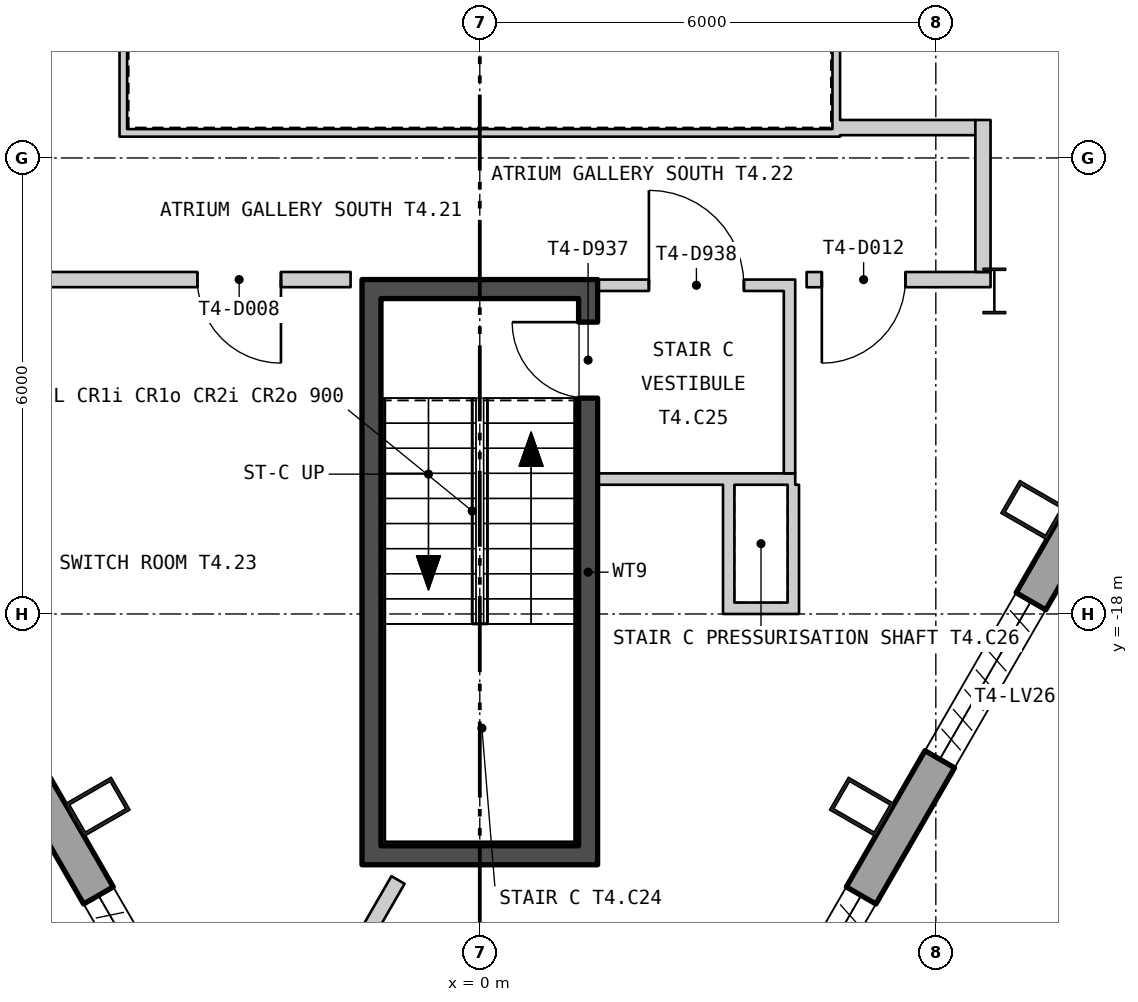
"""IFC4 building model, lengths in metres.
Left out: names, types, materials, properties, quantities, classifications, styles, units other than length and angle.
Written with IfcOpenShell. Run it as: python <this file> out.ifc"""

import sys

from ifc_helpers import new_model, si_unit, direction, frame, frame_2d, origin, origin_2d, place, context, subcontext, project, spatial, polyline, rectangle, hollow_rectangle, i_section, outline, extrude, element, fill, save


model = new_model("IFC4")
c1 = context("Model", 3, precision=1e-05, world=origin(), true_north=direction((0.0, 1.0)))
c2 = subcontext(c1, "Body", "Model", "MODEL_VIEW")
j1 = project(units=[si_unit("LENGTHUNIT", "METRE"), si_unit("PLANEANGLEUNIT", "RADIAN")], contexts=[c1])
p1 = place(None, origin())
s1 = spatial("IfcSite", under=j1, at=p1, CompositionType="ELEMENT")
p2 = place(p1, origin())
s2 = spatial("IfcBuilding", under=s1, at=p2, CompositionType="ELEMENT")
p3 = place(p2, frame((0.0, 0.0, 239.4)))
s3 = spatial("IfcBuildingStorey", under=s2, at=p3, CompositionType="ELEMENT", Elevation=239.4)
for number, where, z_axis, x_axis in (
    (1, (-5.027, -20.537, 0.0), (0.0, 0.0, 1.0), (0.5, -0.866, 0.0)),
    (2, (5.027, -20.537, 0.0), (0.0, 0.0, 1.0), (0.5, 0.866, 0.0)),
    (3, (7.281, -16.633, 0.0), (0.0, 0.0, 1.0), (0.5, 0.866, 0.0)),
):
    element("IfcColumn", number, at=place(p3, frame(where, z_axis=z_axis, x_axis=x_axis)), inside=s3, PredefinedType="COLUMN", context=c2, shape_type="SweptSolid", body=[
        extrude(hollow_rectangle(XDim=0.5, YDim=0.7, WallThickness=0.045, at=origin_2d()), origin(), (0.0, 0.0, 1.0), 6.0),
    ])
p4 = place(p3, frame((6.77, -13.75, 0.0), z_axis=(0.0, 0.0, 1.0), x_axis=(1.0, 0.0, 0.0)))
e4 = element("IfcColumn", 4, at=p4, inside=s3, PredefinedType="COLUMN", context=c2, shape_type="SweptSolid", body=[
    extrude(i_section(OverallWidth=0.3, OverallDepth=0.6, WebThickness=0.015, FlangeThickness=0.03, at=origin_2d()), origin(), (0.0, 0.0, 1.0), 6.0),
])
p5 = place(p3, frame((-25.975, 14.597, -0.18), z_axis=(0.0, 0.0, 1.0), x_axis=(0.499999764979, -0.866025539474, 0.0)))
e5 = element("IfcWall", 5, at=p5, inside=s3, PredefinedType="SOLIDWALL", context=c2, shape_type="SweptSolid", body=[
    extrude(outline(polyline([(-0.13, -0.225), (45.87, -0.225), (45.61, 0.225), (0.13, 0.225), (-0.13, -0.225)])), origin(), (0.0, 0.0, 1.0), 6.0),
])
p6 = place(p5, frame((1.424, 0.0, 1.38)))
e6 = element("IfcOpeningElement", 6, at=p6, cuts=e5, PredefinedType="OPENING", context=c2, shape_type="SweptSolid", body=[
    extrude(rectangle(XDim=2.4, YDim=3.6, at=frame_2d((1.2, 1.8))), frame((0.0, 0.235, 0.0), z_axis=(0.0, -1.0, 0.0), x_axis=(1.0, 0.0, 0.0)), (0.0, 0.0, 1.0), 0.47),
])
p7 = place(p5, frame((5.893, 0.0, 1.38)))
e7 = element("IfcOpeningElement", 7, at=p7, cuts=e5, PredefinedType="OPENING", context=c2, shape_type="SweptSolid", body=[
    extrude(rectangle(XDim=2.4, YDim=3.6, at=frame_2d((1.2, 1.8))), frame((0.0, 0.235, 0.0), z_axis=(0.0, -1.0, 0.0), x_axis=(1.0, 0.0, 0.0)), (0.0, 0.0, 1.0), 0.47),
])
p8 = place(p5, frame((10.401, 0.0, 1.38)))
e8 = element("IfcOpeningElement", 8, at=p8, cuts=e5, PredefinedType="OPENING", context=c2, shape_type="SweptSolid", body=[
    extrude(rectangle(XDim=2.4, YDim=3.6, at=frame_2d((1.2, 1.8))), frame((0.0, 0.235, 0.0), z_axis=(0.0, -1.0, 0.0), x_axis=(1.0, 0.0, 0.0)), (0.0, 0.0, 1.0), 0.47),
])
p9 = place(p5, frame((14.909, 0.0, 1.38)))
e9 = element("IfcOpeningElement", 9, at=p9, cuts=e5, PredefinedType="OPENING", context=c2, shape_type="SweptSolid", body=[
    extrude(rectangle(XDim=2.4, YDim=3.6, at=frame_2d((1.2, 1.8))), frame((0.0, 0.235, 0.0), z_axis=(0.0, -1.0, 0.0), x_axis=(1.0, 0.0, 0.0)), (0.0, 0.0, 1.0), 0.47),
])
p10 = place(p5, frame((19.416, 0.0, 1.38)))
e10 = element("IfcOpeningElement", 10, at=p10, cuts=e5, PredefinedType="OPENING", context=c2, shape_type="SweptSolid", body=[
    extrude(rectangle(XDim=2.4, YDim=3.6, at=frame_2d((1.2, 1.8))), frame((0.0, 0.235, 0.0), z_axis=(0.0, -1.0, 0.0), x_axis=(1.0, 0.0, 0.0)), (0.0, 0.0, 1.0), 0.47),
])
p11 = place(p5, frame((23.924, 0.0, 1.38)))
e11 = element("IfcOpeningElement", 11, at=p11, cuts=e5, PredefinedType="OPENING", context=c2, shape_type="SweptSolid", body=[
    extrude(rectangle(XDim=2.4, YDim=3.6, at=frame_2d((1.2, 1.8))), frame((0.0, 0.235, 0.0), z_axis=(0.0, -1.0, 0.0), x_axis=(1.0, 0.0, 0.0)), (0.0, 0.0, 1.0), 0.47),
])
p12 = place(p5, frame((28.431, 0.0, 1.38)))
e12 = element("IfcOpeningElement", 12, at=p12, cuts=e5, PredefinedType="OPENING", context=c2, shape_type="SweptSolid", body=[
    extrude(rectangle(XDim=2.4, YDim=3.6, at=frame_2d((1.2, 1.8))), frame((0.0, 0.235, 0.0), z_axis=(0.0, -1.0, 0.0), x_axis=(1.0, 0.0, 0.0)), (0.0, 0.0, 1.0), 0.47),
])
p13 = place(p5, frame((32.939, 0.0, 1.38)))
e13 = element("IfcOpeningElement", 13, at=p13, cuts=e5, PredefinedType="OPENING", context=c2, shape_type="SweptSolid", body=[
    extrude(rectangle(XDim=2.4, YDim=3.6, at=frame_2d((1.2, 1.8))), frame((0.0, 0.235, 0.0), z_axis=(0.0, -1.0, 0.0), x_axis=(1.0, 0.0, 0.0)), (0.0, 0.0, 1.0), 0.47),
])
p14 = place(p5, frame((37.447, 0.0, 1.38)))
e14 = element("IfcOpeningElement", 14, at=p14, cuts=e5, PredefinedType="OPENING", context=c2, shape_type="SweptSolid", body=[
    extrude(rectangle(XDim=2.4, YDim=3.6, at=frame_2d((1.2, 1.8))), frame((0.0, 0.235, 0.0), z_axis=(0.0, -1.0, 0.0), x_axis=(1.0, 0.0, 0.0)), (0.0, 0.0, 1.0), 0.47),
])
p15 = place(p5, frame((41.916, 0.0, 1.38)))
e15 = element("IfcOpeningElement", 15, at=p15, cuts=e5, PredefinedType="OPENING", context=c2, shape_type="SweptSolid", body=[
    extrude(rectangle(XDim=2.4, YDim=3.6, at=frame_2d((1.2, 1.8))), frame((0.0, 0.235, 0.0), z_axis=(0.0, -1.0, 0.0), x_axis=(1.0, 0.0, 0.0)), (0.0, 0.0, 1.0), 0.47),
])
p16 = place(p3, frame((3.105, -25.015, -0.18), z_axis=(0.0, 0.0, 1.0), x_axis=(0.499999764979, 0.866025539474, 0.0)))
e16 = element("IfcWall", 16, at=p16, inside=s3, PredefinedType="SOLIDWALL", context=c2, shape_type="SweptSolid", body=[
    extrude(outline(polyline([(-0.13, -0.225), (45.87, -0.225), (45.61, 0.225), (0.13, 0.225), (-0.13, -0.225)])), origin(), (0.0, 0.0, 1.0), 6.0),
])
p17 = place(p16, frame((1.424, 0.0, 1.38)))
e17 = element("IfcOpeningElement", 17, at=p17, cuts=e16, PredefinedType="OPENING", context=c2, shape_type="SweptSolid", body=[
    extrude(rectangle(XDim=2.4, YDim=3.6, at=frame_2d((1.2, 1.8))), frame((0.0, 0.235, 0.0), z_axis=(0.0, -1.0, 0.0), x_axis=(1.0, 0.0, 0.0)), (0.0, 0.0, 1.0), 0.47),
])
p18 = place(p16, frame((5.893, 0.0, 1.38)))
e18 = element("IfcOpeningElement", 18, at=p18, cuts=e16, PredefinedType="OPENING", context=c2, shape_type="SweptSolid", body=[
    extrude(rectangle(XDim=2.4, YDim=3.6, at=frame_2d((1.2, 1.8))), frame((0.0, 0.235, 0.0), z_axis=(0.0, -1.0, 0.0), x_axis=(1.0, 0.0, 0.0)), (0.0, 0.0, 1.0), 0.47),
])
p19 = place(p16, frame((10.401, 0.0, 1.38)))
e19 = element("IfcOpeningElement", 19, at=p19, cuts=e16, PredefinedType="OPENING", context=c2, shape_type="SweptSolid", body=[
    extrude(rectangle(XDim=2.4, YDim=3.6, at=frame_2d((1.2, 1.8))), frame((0.0, 0.235, 0.0), z_axis=(0.0, -1.0, 0.0), x_axis=(1.0, 0.0, 0.0)), (0.0, 0.0, 1.0), 0.47),
])
p20 = place(p16, frame((14.909, 0.0, 1.38)))
e20 = element("IfcOpeningElement", 20, at=p20, cuts=e16, PredefinedType="OPENING", context=c2, shape_type="SweptSolid", body=[
    extrude(rectangle(XDim=2.4, YDim=3.6, at=frame_2d((1.2, 1.8))), frame((0.0, 0.235, 0.0), z_axis=(0.0, -1.0, 0.0), x_axis=(1.0, 0.0, 0.0)), (0.0, 0.0, 1.0), 0.47),
])
p21 = place(p16, frame((19.416, 0.0, 1.38)))
e21 = element("IfcOpeningElement", 21, at=p21, cuts=e16, PredefinedType="OPENING", context=c2, shape_type="SweptSolid", body=[
    extrude(rectangle(XDim=2.4, YDim=3.6, at=frame_2d((1.2, 1.8))), frame((0.0, 0.235, 0.0), z_axis=(0.0, -1.0, 0.0), x_axis=(1.0, 0.0, 0.0)), (0.0, 0.0, 1.0), 0.47),
])
p22 = place(p16, frame((23.924, 0.0, 1.38)))
e22 = element("IfcOpeningElement", 22, at=p22, cuts=e16, PredefinedType="OPENING", context=c2, shape_type="SweptSolid", body=[
    extrude(rectangle(XDim=2.4, YDim=3.6, at=frame_2d((1.2, 1.8))), frame((0.0, 0.235, 0.0), z_axis=(0.0, -1.0, 0.0), x_axis=(1.0, 0.0, 0.0)), (0.0, 0.0, 1.0), 0.47),
])
p23 = place(p16, frame((28.431, 0.0, 1.38)))
e23 = element("IfcOpeningElement", 23, at=p23, cuts=e16, PredefinedType="OPENING", context=c2, shape_type="SweptSolid", body=[
    extrude(rectangle(XDim=2.4, YDim=3.6, at=frame_2d((1.2, 1.8))), frame((0.0, 0.235, 0.0), z_axis=(0.0, -1.0, 0.0), x_axis=(1.0, 0.0, 0.0)), (0.0, 0.0, 1.0), 0.47),
])
p24 = place(p16, frame((32.939, 0.0, 1.38)))
e24 = element("IfcOpeningElement", 24, at=p24, cuts=e16, PredefinedType="OPENING", context=c2, shape_type="SweptSolid", body=[
    extrude(rectangle(XDim=2.4, YDim=3.6, at=frame_2d((1.2, 1.8))), frame((0.0, 0.235, 0.0), z_axis=(0.0, -1.0, 0.0), x_axis=(1.0, 0.0, 0.0)), (0.0, 0.0, 1.0), 0.47),
])
p25 = place(p16, frame((37.447, 0.0, 1.38)))
e25 = element("IfcOpeningElement", 25, at=p25, cuts=e16, PredefinedType="OPENING", context=c2, shape_type="SweptSolid", body=[
    extrude(rectangle(XDim=2.4, YDim=3.6, at=frame_2d((1.2, 1.8))), frame((0.0, 0.235, 0.0), z_axis=(0.0, -1.0, 0.0), x_axis=(1.0, 0.0, 0.0)), (0.0, 0.0, 1.0), 0.47),
])
p26 = place(p16, frame((41.916, 0.0, 1.38)))
e26 = element("IfcOpeningElement", 26, at=p26, cuts=e16, PredefinedType="OPENING", context=c2, shape_type="SweptSolid", body=[
    extrude(rectangle(XDim=2.4, YDim=3.6, at=frame_2d((1.2, 1.8))), frame((0.0, 0.235, 0.0), z_axis=(0.0, -1.0, 0.0), x_axis=(1.0, 0.0, 0.0)), (0.0, 0.0, 1.0), 0.47),
])
p27 = place(p3, frame((-4.74, -11.67, 0.0), z_axis=(0.0, 0.0, 1.0), x_axis=(1.0, 0.0, 0.0)))
e27 = element("IfcWall", 27, at=p27, inside=s3, PredefinedType="PARTITIONING", context=c2, shape_type="SweptSolid", body=[
    extrude(rectangle(XDim=9.48, YDim=0.1, at=frame_2d((4.74, 0.0))), origin(), (0.0, 0.0, 1.0), 5.8),
])
for number, where, z_axis, x_axis in (
    (28, (4.69, -11.62, 0.0), (0.0, 0.0, 1.0), (0.0, 1.0, 0.0)),
    (29, (-4.69, -3.58, 0.0), (0.0, 0.0, 1.0), (0.0, -1.0, 0.0)),
):
    element("IfcWall", number, at=place(p3, frame(where, z_axis=z_axis, x_axis=x_axis)), inside=s3, PredefinedType="PARTITIONING", context=c2, shape_type="SweptSolid", body=[
        extrude(rectangle(XDim=8.04, YDim=0.1, at=frame_2d((4.02, 0.0))), origin(), (0.0, 0.0, 1.0), 5.8),
    ])
p28 = place(p3, frame((-1.425, -21.05, 0.0), z_axis=(0.0, 0.0, 1.0), x_axis=(0.0, 1.0, 0.0)))
e30 = element("IfcWall", 30, at=p28, inside=s3, PredefinedType="SHEAR", context=c2, shape_type="SweptSolid", body=[
    extrude(rectangle(XDim=7.2, YDim=0.25, at=frame_2d((3.6, 0.0))), origin(), (0.0, 0.0, 1.0), 5.8),
])
p29 = place(p3, frame((1.425, -21.05, 0.0), z_axis=(0.0, 0.0, 1.0), x_axis=(0.0, 1.0, 0.0)))
e31 = element("IfcWall", 31, at=p29, inside=s3, PredefinedType="SHEAR", context=c2, shape_type="SweptSolid", body=[
    extrude(rectangle(XDim=7.2, YDim=0.25, at=frame_2d((3.6, 0.0))), origin(), (0.0, 0.0, 1.0), 5.8),
])
p30 = place(p29, frame((5.89, 0.0, 0.0)))
e32 = element("IfcOpeningElement", 32, at=p30, cuts=e31, PredefinedType="OPENING", context=c2, shape_type="SweptSolid", body=[
    extrude(rectangle(XDim=1.0, YDim=2.1, at=frame_2d((0.5, 1.05))), frame((0.0, 0.135, 0.0), z_axis=(0.0, -1.0, 0.0), x_axis=(1.0, 0.0, 0.0)), (0.0, 0.0, 1.0), 0.27),
])
for number, where, z_axis, x_axis in (
    (33, (-1.55, -21.175, 0.0), (0.0, 0.0, 1.0), (1.0, 0.0, 0.0)),
    (34, (-1.55, -13.725, 0.0), (0.0, 0.0, 1.0), (1.0, 0.0, 0.0)),
):
    element("IfcWall", number, at=place(p3, frame(where, z_axis=z_axis, x_axis=x_axis)), inside=s3, PredefinedType="SHEAR", context=c2, shape_type="SweptSolid", body=[
        extrude(rectangle(XDim=3.1, YDim=0.25, at=frame_2d((1.55, 0.0))), origin(), (0.0, 0.0, 1.0), 5.8),
    ])
p31 = place(p3, frame((1.55, -16.225, 0.0), z_axis=(0.0, 0.0, 1.0), x_axis=(1.0, 0.0, 0.0)))
e35 = element("IfcWall", 35, at=p31, inside=s3, PredefinedType="PARTITIONING", context=c2, shape_type="SweptSolid", body=[
    extrude(rectangle(XDim=2.6, YDim=0.15, at=frame_2d((1.3, 0.0))), origin(), (0.0, 0.0, 1.0), 5.8),
])
p32 = place(p3, frame((4.075, -16.15, 0.0), z_axis=(0.0, 0.0, 1.0), x_axis=(0.0, 1.0, 0.0)))
e36 = element("IfcWall", 36, at=p32, inside=s3, PredefinedType="PARTITIONING", context=c2, shape_type="SweptSolid", body=[
    extrude(rectangle(XDim=2.4, YDim=0.15, at=frame_2d((1.2, 0.0))), origin(), (0.0, 0.0, 1.0), 5.8),
])
p33 = place(p3, frame((1.55, -13.675, 0.0), z_axis=(0.0, 0.0, 1.0), x_axis=(1.0, 0.0, 0.0)))
e37 = element("IfcWall", 37, at=p33, inside=s3, PredefinedType="PARTITIONING", context=c2, shape_type="SweptSolid", body=[
    extrude(rectangle(XDim=2.6, YDim=0.15, at=frame_2d((1.3, 0.0))), origin(), (0.0, 0.0, 1.0), 5.01),
])
p34 = place(p33, frame((0.675, 0.0, 0.0)))
e38 = element("IfcOpeningElement", 38, at=p34, cuts=e37, PredefinedType="OPENING", context=c2, shape_type="SweptSolid", body=[
    extrude(rectangle(XDim=1.25, YDim=2.1, at=frame_2d((0.625, 1.05))), frame((0.0, 0.085, 0.0), z_axis=(0.0, -1.0, 0.0), x_axis=(1.0, 0.0, 0.0)), (0.0, 0.0, 1.0), 0.17),
])
p35 = place(p3, frame((3.275, -18.0, 0.0), z_axis=(0.0, 0.0, 1.0), x_axis=(0.0, 1.0, 0.0)))
e39 = element("IfcWall", 39, at=p35, inside=s3, PredefinedType="PARTITIONING", context=c2, shape_type="SweptSolid", body=[
    extrude(rectangle(XDim=1.7, YDim=0.15, at=frame_2d((0.85, 0.0))), origin(), (0.0, 0.0, 1.0), 5.11),
])
p36 = place(p3, frame((3.35, -17.925, 0.0), z_axis=(0.0, 0.0, 1.0), x_axis=(1.0, 0.0, 0.0)))
e40 = element("IfcWall", 40, at=p36, inside=s3, PredefinedType="PARTITIONING", context=c2, shape_type="SweptSolid", body=[
    extrude(rectangle(XDim=0.7, YDim=0.15, at=frame_2d((0.35, 0.0))), origin(), (0.0, 0.0, 1.0), 5.8),
])
p37 = place(p3, frame((4.125, -18.0, 0.0), z_axis=(0.0, 0.0, 1.0), x_axis=(0.0, 1.0, 0.0)))
e41 = element("IfcWall", 41, at=p37, inside=s3, PredefinedType="PARTITIONING", context=c2, shape_type="SweptSolid", body=[
    extrude(rectangle(XDim=1.7, YDim=0.15, at=frame_2d((0.85, 0.0))), origin(), (0.0, 0.0, 1.0), 5.8),
])
p38 = place(p3, frame((-6.52, -13.6, 0.0), z_axis=(0.0, 0.0, 1.0), x_axis=(1.0, 0.0, 0.0)))
e42 = element("IfcWall", 42, at=p38, inside=s3, PredefinedType="PARTITIONING", context=c2, shape_type="SweptSolid", body=[
    extrude(rectangle(XDim=4.82, YDim=0.2, at=frame_2d((2.41, 0.0))), origin(), (0.0, 0.0, 1.0), 5.01),
])
p39 = place(p38, frame((2.804, 0.0, 0.0)))
e43 = element("IfcOpeningElement", 43, at=p39, cuts=e42, PredefinedType="OPENING", context=c2, shape_type="SweptSolid", body=[
    extrude(rectangle(XDim=1.1, YDim=2.1, at=frame_2d((0.55, 1.05))), frame((0.0, 0.11, 0.0), z_axis=(0.0, -1.0, 0.0), x_axis=(1.0, 0.0, 0.0)), (0.0, 0.0, 1.0), 0.22),
])
p40 = place(p3, frame((-2.646, -24.221, 0.0), z_axis=(0.0, 0.0, 1.0), x_axis=(0.499768381861, 0.866159087288, 0.0)))
e44 = element("IfcWall", 44, at=p40, inside=s3, PredefinedType="PARTITIONING", context=c2, shape_type="SweptSolid", body=[
    extrude(rectangle(XDim=3.142, YDim=0.2, at=frame_2d((1.571, 0.0))), origin(), (0.0, 0.0, 1.0), 5.8),
])
p41 = place(p3, frame((4.3, -13.601, 0.0), z_axis=(0.0, 0.0, 1.0), x_axis=(0.999999914623, 0.000413223105, 0.0)))
e45 = element("IfcWall", 45, at=p41, inside=s3, PredefinedType="PARTITIONING", context=c2, shape_type="SweptSolid", body=[
    extrude(rectangle(XDim=2.42, YDim=0.2, at=frame_2d((1.21, 0.0))), origin(), (0.0, 0.0, 1.0), 5.01),
])
p42 = place(p41, frame((0.2, 0.0, 0.0)))
e46 = element("IfcOpeningElement", 46, at=p42, cuts=e45, PredefinedType="OPENING", context=c2, shape_type="SweptSolid", body=[
    extrude(rectangle(XDim=1.1, YDim=2.1, at=frame_2d((0.55, 1.05))), frame((0.0, 0.11, 0.0), z_axis=(0.0, -1.0, 0.0), x_axis=(1.0, 0.0, 0.0)), (0.0, 0.0, 1.0), 0.22),
])
p43 = place(p3, frame((4.74, -11.6, 0.0), z_axis=(0.0, 0.0, 1.0), x_axis=(1.0, 0.0, 0.0)))
e47 = element("IfcWall", 47, at=p43, inside=s3, PredefinedType="PARTITIONING", context=c2, shape_type="SweptSolid", body=[
    extrude(rectangle(XDim=1.78, YDim=0.2, at=frame_2d((0.89, 0.0))), origin(), (0.0, 0.0, 1.0), 5.8),
])
p44 = place(p3, frame((6.62, -13.5, 0.0), z_axis=(0.0, 0.0, 1.0), x_axis=(0.0, 1.0, 0.0)))
e48 = element("IfcWall", 48, at=p44, inside=s3, PredefinedType="PARTITIONING", context=c2, shape_type="SweptSolid", body=[
    extrude(rectangle(XDim=2.0, YDim=0.2, at=frame_2d((1.0, 0.0))), origin(), (0.0, 0.0, 1.0), 5.21),
])
p45 = place(p30, origin())
e49 = element("IfcDoor", 49, at=p45, inside=s3, OperationType="SINGLE_SWING_LEFT", PredefinedType="DOOR", context=c2, shape_type="SweptSolid", body=[
    extrude(rectangle(XDim=1.0, YDim=2.1, at=frame_2d((0.5, 1.05))), frame((0.0, 0.025, 0.0), z_axis=(0.0, -1.0, 0.0), x_axis=(1.0, 0.0, 0.0)), (0.0, 0.0, 1.0), 0.05),
])
fill(e32, e49)
p46 = place(p34, origin())
e50 = element("IfcDoor", 50, at=p46, inside=s3, OperationType="SINGLE_SWING_RIGHT", PredefinedType="DOOR", context=c2, shape_type="SweptSolid", body=[
    extrude(rectangle(XDim=1.25, YDim=2.1, at=frame_2d((0.625, 1.05))), frame((0.0, 0.025, 0.0), z_axis=(0.0, -1.0, 0.0), x_axis=(1.0, 0.0, 0.0)), (0.0, 0.0, 1.0), 0.05),
])
fill(e38, e50)
p47 = place(p39, origin())
e51 = element("IfcDoor", 51, at=p47, inside=s3, OperationType="SINGLE_SWING_RIGHT", PredefinedType="DOOR", context=c2, shape_type="SweptSolid", body=[
    extrude(rectangle(XDim=1.1, YDim=2.1, at=frame_2d((0.55, 1.05))), frame((0.0, 0.025, 0.0), z_axis=(0.0, -1.0, 0.0), x_axis=(1.0, 0.0, 0.0)), (0.0, 0.0, 1.0), 0.05),
])
fill(e43, e51)
p48 = place(p42, origin())
e52 = element("IfcDoor", 52, at=p48, inside=s3, OperationType="SINGLE_SWING_LEFT", PredefinedType="DOOR", context=c2, shape_type="SweptSolid", body=[
    extrude(rectangle(XDim=1.1, YDim=2.1, at=frame_2d((0.55, 1.05))), frame((0.0, 0.025, 0.0), z_axis=(0.0, -1.0, 0.0), x_axis=(1.0, 0.0, 0.0)), (0.0, 0.0, 1.0), 0.05),
])
fill(e46, e52)
save(model, sys.argv[1])
